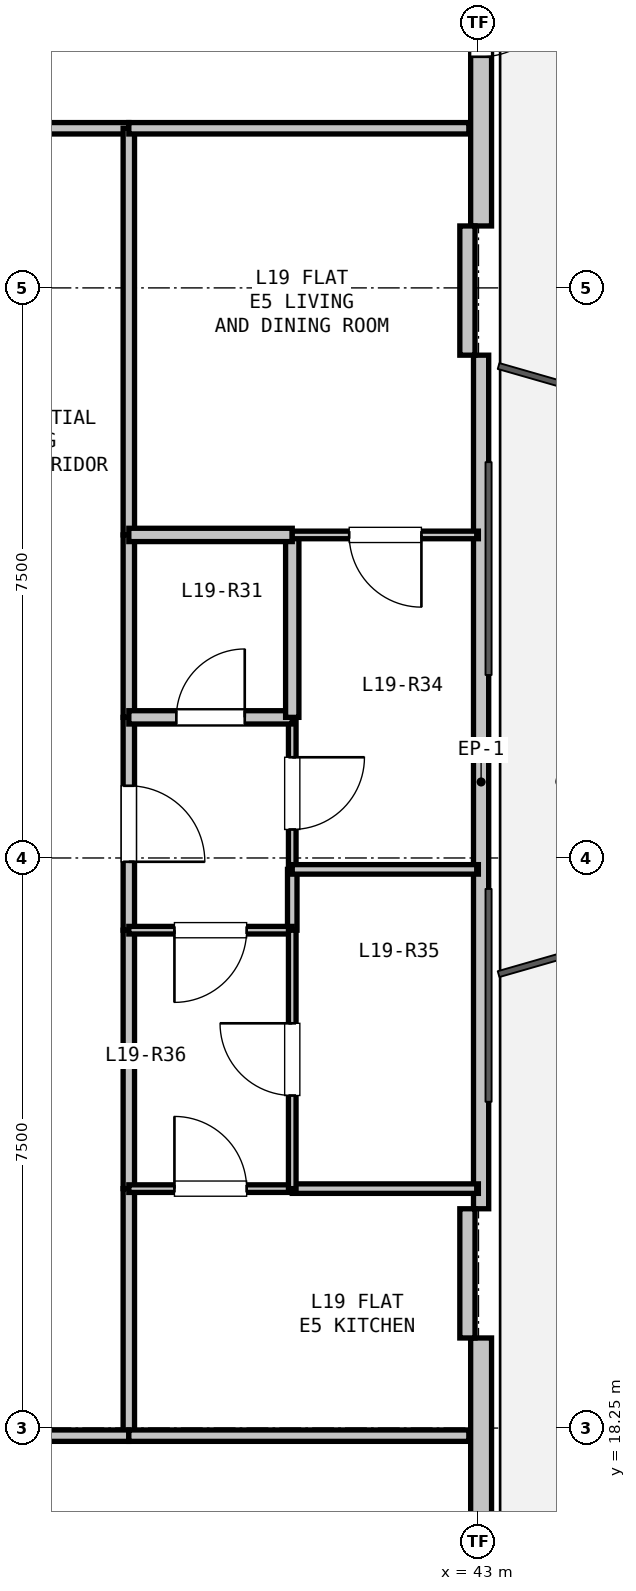
"""IFC4 building model, lengths in metres.
Left out: names, types, materials, properties, quantities, classifications, styles, units other than length and angle.
Written with IfcOpenShell. Run it as: python <this file> out.ifc"""

import sys

from ifc_helpers import new_model, si_unit, direction, frame, frame_2d, origin, place, context, subcontext, project, spatial, rectangle, extrude, element, fill, save


model = new_model("IFC4")
c1 = context("Model", 3, precision=1e-05, world=origin(), true_north=direction((0.0, 1.0)))
c2 = subcontext(c1, "Body", "Model", "MODEL_VIEW")
j1 = project(units=[si_unit("LENGTHUNIT", "METRE"), si_unit("PLANEANGLEUNIT", "RADIAN")], contexts=[c1])
p1 = place(None, origin())
s1 = spatial("IfcSite", under=j1, at=p1, CompositionType="ELEMENT")
p2 = place(p1, origin())
s2 = spatial("IfcBuilding", under=s1, at=p2, CompositionType="ELEMENT")
p3 = place(p2, frame((0.0, 0.0, 73.5)))
s3 = spatial("IfcBuildingStorey", under=s2, at=p3, CompositionType="ELEMENT", Elevation=73.5)
p4 = place(p3, frame((43.035, 45.994, 0.0), z_axis=(0.0, 0.0, 1.0), x_axis=(0.0, -1.0, 0.0)))
e1 = element("IfcWall", 1, at=p4, inside=s3, PredefinedType="SOLIDWALL", context=c2, shape_type="SweptSolid", body=[
    extrude(rectangle(XDim=11.93, YDim=0.275, at=frame_2d((5.965, 0.0))), origin(), (0.0, 0.0, 1.0), 2.67),
])
p5 = place(p4, frame((8.704, 0.0, 0.0)))
e2 = element("IfcOpeningElement", 2, at=p5, cuts=e1, PredefinedType="OPENING", context=c2, shape_type="SweptSolid", body=[
    extrude(rectangle(XDim=1.0, YDim=2.1, at=frame_2d((0.5, 1.05))), frame((0.0, 0.147, 0.0), z_axis=(0.0, -1.0, 0.0), x_axis=(1.0, 0.0, 0.0)), (0.0, 0.0, 1.0), 0.295),
])
p6 = place(p4, frame((4.214, 0.0, 0.9)))
e3 = element("IfcOpeningElement", 3, at=p6, cuts=e1, PredefinedType="OPENING", context=c2, shape_type="SweptSolid", body=[
    extrude(rectangle(XDim=0.9, YDim=1.4, at=frame_2d((0.45, 0.7))), frame((0.0, 0.147, 0.0), z_axis=(0.0, -1.0, 0.0), x_axis=(1.0, 0.0, 0.0)), (0.0, 0.0, 1.0), 0.295),
])
p7 = place(p3, frame((43.035, 32.365, 0.0), z_axis=(0.0, 0.0, 1.0), x_axis=(0.0, -1.0, 0.0)))
e4 = element("IfcWall", 4, at=p7, inside=s3, PredefinedType="PARAPET", context=c2, shape_type="SweptSolid", body=[
    extrude(rectangle(XDim=11.229, YDim=0.2, at=frame_2d((5.615, 0.0))), origin(), (0.0, 0.0, 1.0), 0.2),
])
p8 = place(p3, frame((43.035, 19.435, 0.0), z_axis=(0.0, 0.0, 1.0), x_axis=(0.0, -1.0, 0.0)))
e5 = element("IfcWall", 5, at=p8, inside=s3, PredefinedType="SOLIDWALL", context=c2, shape_type="SweptSolid", body=[
    extrude(rectangle(XDim=11.93, YDim=0.275, at=frame_2d((5.965, 0.0))), origin(), (0.0, 0.0, 1.0), 2.67),
])
p9 = place(p8, frame((9.826, 0.0, 0.9)))
e6 = element("IfcOpeningElement", 6, at=p9, cuts=e5, PredefinedType="OPENING", context=c2, shape_type="SweptSolid", body=[
    extrude(rectangle(XDim=1.2, YDim=1.4, at=frame_2d((0.6, 0.7))), frame((0.0, 0.147, 0.0), z_axis=(0.0, -1.0, 0.0), x_axis=(1.0, 0.0, 0.0)), (0.0, 0.0, 1.0), 0.295),
])
for number, where, z_axis, x_axis in (
    (7, (42.854, 34.065, 0.0), (0.0, 0.0, 1.0), (0.0, -1.0, 0.0)),
    (8, (42.854, 21.135, 0.0), (0.0, 0.0, 1.0), (0.0, -1.0, 0.0)),
):
    element("IfcWall", number, at=place(p3, frame(where, z_axis=z_axis, x_axis=x_axis)), inside=s3, PredefinedType="PARAPET", context=c2, shape_type="SweptSolid", body=[
        extrude(rectangle(XDim=1.7, YDim=0.2, at=frame_2d((0.85, 0.0))), origin(), (0.0, 0.0, 1.0), 2.67),
    ])
p10 = place(p3, frame((35.8, 35.35, 0.0), z_axis=(0.0, 0.0, 1.0), x_axis=(1.0, 0.0, 0.0)))
e9 = element("IfcWall", 9, at=p10, inside=s3, PredefinedType="PARTITIONING", context=c2, shape_type="SweptSolid", body=[
    extrude(rectangle(XDim=2.6, YDim=0.15, at=frame_2d((1.3, 0.0))), origin(), (0.0, 0.0, 1.0), 2.423),
])
p11 = place(p3, frame((38.4, 35.35, 0.0), z_axis=(0.0, 0.0, 1.0), x_axis=(0.0, -1.0, 0.0)))
e10 = element("IfcWall", 10, at=p11, inside=s3, PredefinedType="PARTITIONING", context=c2, shape_type="SweptSolid", body=[
    extrude(rectangle(XDim=5.35, YDim=0.15, at=frame_2d((2.675, 0.0))), origin(), (0.0, 0.0, 1.0), 3.05),
])
p12 = place(p3, frame((38.4, 30.0, 0.0), z_axis=(0.0, 0.0, 1.0), x_axis=(0.0, -1.0, 0.0)))
e11 = element("IfcWall", 11, at=p12, inside=s3, PredefinedType="PARTITIONING", context=c2, shape_type="SweptSolid", body=[
    extrude(rectangle(XDim=2.4, YDim=0.15, at=frame_2d((1.2, 0.0))), origin(), (0.0, 0.0, 1.0), 3.05),
])
p13 = place(p3, frame((38.4, 27.6, 0.0), z_axis=(0.0, 0.0, 1.0), x_axis=(0.0, -1.0, 0.0)))
e12 = element("IfcWall", 12, at=p13, inside=s3, PredefinedType="PARTITIONING", context=c2, shape_type="SweptSolid", body=[
    extrude(rectangle(XDim=2.8, YDim=0.15, at=frame_2d((1.4, 0.0))), origin(), (0.0, 0.0, 1.0), 3.05),
])
p14 = place(p13, frame((0.9, 0.0, 0.0)))
e13 = element("IfcOpeningElement", 13, at=p14, cuts=e12, PredefinedType="OPENING", context=c2, shape_type="SweptSolid", body=[
    extrude(rectangle(XDim=1.0, YDim=2.15, at=frame_2d((0.5, 1.075))), frame((0.0, 0.085, 0.0), z_axis=(0.0, -1.0, 0.0), x_axis=(1.0, 0.0, 0.0)), (0.0, 0.0, 1.0), 0.17),
])
p15 = place(p3, frame((38.4, 24.8, 0.0), z_axis=(0.0, 0.0, 1.0), x_axis=(0.0, -1.0, 0.0)))
e14 = element("IfcWall", 14, at=p15, inside=s3, PredefinedType="PARTITIONING", context=c2, shape_type="SweptSolid", body=[
    extrude(rectangle(XDim=3.4, YDim=0.15, at=frame_2d((1.7, 0.0))), origin(), (0.0, 0.0, 1.0), 3.05),
])
p16 = place(p3, frame((38.4, 21.4, 0.0), z_axis=(0.0, 0.0, 1.0), x_axis=(0.0, -1.0, 0.0)))
e15 = element("IfcWall", 15, at=p16, inside=s3, PredefinedType="PARTITIONING", context=c2, shape_type="SweptSolid", body=[
    extrude(rectangle(XDim=3.25, YDim=0.15, at=frame_2d((1.625, 0.0))), origin(), (0.0, 0.0, 1.0), 3.05),
])
p17 = place(p3, frame((38.4, 18.15, 0.0), z_axis=(0.0, 0.0, 1.0), x_axis=(-1.0, 0.0, 0.0)))
e16 = element("IfcWall", 16, at=p17, inside=s3, PredefinedType="PARTITIONING", context=c2, shape_type="SweptSolid", body=[
    extrude(rectangle(XDim=2.6, YDim=0.15, at=frame_2d((1.3, 0.0))), origin(), (0.0, 0.0, 1.0), 2.423),
])
p18 = place(p3, frame((40.55, 27.6, 0.0), z_axis=(0.0, 0.0, 1.0), x_axis=(0.0, -1.0, 0.0)))
e17 = element("IfcWall", 17, at=p18, inside=s3, PredefinedType="PARTITIONING", context=c2, shape_type="SweptSolid", body=[
    extrude(rectangle(XDim=2.0, YDim=0.1, at=frame_2d((1.0, 0.0))), origin(), (0.0, 0.0, 1.0), 3.05),
])
p19 = place(p18, frame((0.525, 0.0, 0.0)))
e18 = element("IfcOpeningElement", 18, at=p19, cuts=e17, PredefinedType="OPENING", context=c2, shape_type="SweptSolid", body=[
    extrude(rectangle(XDim=0.95, YDim=2.1, at=frame_2d((0.475, 1.05))), frame((0.0, 0.06, 0.0), z_axis=(0.0, -1.0, 0.0), x_axis=(1.0, 0.0, 0.0)), (0.0, 0.0, 1.0), 0.12),
])
p20 = place(p3, frame((40.55, 25.6, 0.0), z_axis=(0.0, 0.0, 1.0), x_axis=(0.0, -1.0, 0.0)))
e19 = element("IfcWall", 19, at=p20, inside=s3, PredefinedType="PARTITIONING", context=c2, shape_type="SweptSolid", body=[
    extrude(rectangle(XDim=0.8, YDim=0.125, at=frame_2d((0.4, 0.0))), origin(), (0.0, 0.0, 1.0), 3.05),
])
p21 = place(p3, frame((40.55, 24.8, 0.0), z_axis=(0.0, 0.0, 1.0), x_axis=(-1.0, 0.0, 0.0)))
e20 = element("IfcWall", 20, at=p21, inside=s3, PredefinedType="PARTITIONING", context=c2, shape_type="SweptSolid", body=[
    extrude(rectangle(XDim=2.15, YDim=0.1, at=frame_2d((1.075, 0.0))), origin(), (0.0, 0.0, 1.0), 3.05),
])
p22 = place(p21, frame((0.6, 0.0, 0.0)))
e21 = element("IfcOpeningElement", 21, at=p22, cuts=e20, PredefinedType="OPENING", context=c2, shape_type="SweptSolid", body=[
    extrude(rectangle(XDim=0.95, YDim=2.1, at=frame_2d((0.475, 1.05))), frame((0.0, 0.06, 0.0), z_axis=(0.0, -1.0, 0.0), x_axis=(1.0, 0.0, 0.0)), (0.0, 0.0, 1.0), 0.12),
])
p23 = place(p3, frame((38.4, 27.6, 0.0), z_axis=(0.0, 0.0, 1.0), x_axis=(1.0, 0.0, 0.0)))
e22 = element("IfcWall", 22, at=p23, inside=s3, PredefinedType="PLUMBINGWALL", context=c2, shape_type="SweptSolid", body=[
    extrude(rectangle(XDim=2.15, YDim=0.175, at=frame_2d((1.075, 0.0))), origin(), (0.0, 0.0, 1.0), 3.05),
])
p24 = place(p23, frame((0.625, 0.0, 0.0)))
e23 = element("IfcOpeningElement", 23, at=p24, cuts=e22, PredefinedType="OPENING", context=c2, shape_type="SweptSolid", body=[
    extrude(rectangle(XDim=0.9, YDim=2.1, at=frame_2d((0.45, 1.05))), frame((0.0, 0.097, 0.0), z_axis=(0.0, -1.0, 0.0), x_axis=(1.0, 0.0, 0.0)), (0.0, 0.0, 1.0), 0.195),
])
p25 = place(p3, frame((38.4, 18.15, 0.0), z_axis=(0.0, 0.0, 1.0), x_axis=(1.0, 0.0, 0.0)))
e24 = element("IfcWall", 24, at=p25, inside=s3, PredefinedType="PARTITIONING", context=c2, shape_type="SweptSolid", body=[
    extrude(rectangle(XDim=4.473, YDim=0.15, at=frame_2d((2.237, 0.0))), origin(), (0.0, 0.0, 1.0), 2.365),
])
p26 = place(p3, frame((40.55, 30.0, 0.0), z_axis=(0.0, 0.0, 1.0), x_axis=(0.0, -1.0, 0.0)))
e25 = element("IfcWall", 25, at=p26, inside=s3, PredefinedType="PLUMBINGWALL", context=c2, shape_type="SweptSolid", body=[
    extrude(rectangle(XDim=2.4, YDim=0.175, at=frame_2d((1.2, 0.0))), origin(), (0.0, 0.0, 1.0), 3.05),
])
p27 = place(p3, frame((38.4, 30.0, 0.0), z_axis=(0.0, 0.0, 1.0), x_axis=(1.0, 0.0, 0.0)))
e26 = element("IfcWall", 26, at=p27, inside=s3, PredefinedType="PLUMBINGWALL", context=c2, shape_type="SweptSolid", body=[
    extrude(rectangle(XDim=2.15, YDim=0.175, at=frame_2d((1.075, 0.0))), origin(), (0.0, 0.0, 1.0), 3.05),
])
p28 = place(p3, frame((38.4, 21.4, 0.0), z_axis=(0.0, 0.0, 1.0), x_axis=(1.0, 0.0, 0.0)))
e27 = element("IfcWall", 27, at=p28, inside=s3, PredefinedType="PARTITIONING", context=c2, shape_type="SweptSolid", body=[
    extrude(rectangle(XDim=2.15, YDim=0.1, at=frame_2d((1.075, 0.0))), origin(), (0.0, 0.0, 1.0), 3.05),
])
p29 = place(p28, frame((0.6, 0.0, 0.0)))
e28 = element("IfcOpeningElement", 28, at=p29, cuts=e27, PredefinedType="OPENING", context=c2, shape_type="SweptSolid", body=[
    extrude(rectangle(XDim=0.95, YDim=2.1, at=frame_2d((0.475, 1.05))), frame((0.0, 0.06, 0.0), z_axis=(0.0, -1.0, 0.0), x_axis=(1.0, 0.0, 0.0)), (0.0, 0.0, 1.0), 0.12),
])
p30 = place(p3, frame((40.55, 21.4, 0.0), z_axis=(0.0, 0.0, 1.0), x_axis=(1.0, 0.0, 0.0)))
e29 = element("IfcWall", 29, at=p30, inside=s3, PredefinedType="PARTITIONING", context=c2, shape_type="SweptSolid", body=[
    extrude(rectangle(XDim=2.448, YDim=0.125, at=frame_2d((1.224, 0.0))), origin(), (0.0, 0.0, 1.0), 2.365),
])
p31 = place(p3, frame((42.873, 35.35, 0.0), z_axis=(0.0, 0.0, 1.0), x_axis=(-1.0, 0.0, 0.0)))
e30 = element("IfcWall", 30, at=p31, inside=s3, PredefinedType="PARTITIONING", context=c2, shape_type="SweptSolid", body=[
    extrude(rectangle(XDim=4.473, YDim=0.15, at=frame_2d((2.237, 0.0))), origin(), (0.0, 0.0, 1.0), 2.365),
])
p32 = place(p3, frame((42.999, 30.0, 0.0), z_axis=(0.0, 0.0, 1.0), x_axis=(-1.0, 0.0, 0.0)))
e31 = element("IfcWall", 31, at=p32, inside=s3, PredefinedType="PARTITIONING", context=c2, shape_type="SweptSolid", body=[
    extrude(rectangle(XDim=2.448, YDim=0.1, at=frame_2d((1.224, 0.0))), origin(), (0.0, 0.0, 1.0), 2.365),
])
p33 = place(p32, frame((0.749, 0.0, 0.0)))
e32 = element("IfcOpeningElement", 32, at=p33, cuts=e31, PredefinedType="OPENING", context=c2, shape_type="SweptSolid", body=[
    extrude(rectangle(XDim=0.95, YDim=2.1, at=frame_2d((0.475, 1.05))), frame((0.0, 0.06, 0.0), z_axis=(0.0, -1.0, 0.0), x_axis=(1.0, 0.0, 0.0)), (0.0, 0.0, 1.0), 0.12),
])
p34 = place(p3, frame((42.999, 25.6, 0.0), z_axis=(0.0, 0.0, 1.0), x_axis=(-1.0, 0.0, 0.0)))
e33 = element("IfcWall", 33, at=p34, inside=s3, PredefinedType="PARTITIONING", context=c2, shape_type="SweptSolid", body=[
    extrude(rectangle(XDim=2.448, YDim=0.125, at=frame_2d((1.224, 0.0))), origin(), (0.0, 0.0, 1.0), 2.365),
])
p35 = place(p3, frame((40.55, 21.4, 0.0), z_axis=(0.0, 0.0, 1.0), x_axis=(0.0, 1.0, 0.0)))
e34 = element("IfcWall", 34, at=p35, inside=s3, PredefinedType="PARTITIONING", context=c2, shape_type="SweptSolid", body=[
    extrude(rectangle(XDim=3.4, YDim=0.1, at=frame_2d((1.7, 0.0))), origin(), (0.0, 0.0, 1.0), 3.05),
])
p36 = place(p35, frame((1.225, 0.0, 0.0)))
e35 = element("IfcOpeningElement", 35, at=p36, cuts=e34, PredefinedType="OPENING", context=c2, shape_type="SweptSolid", body=[
    extrude(rectangle(XDim=0.95, YDim=2.1, at=frame_2d((0.475, 1.05))), frame((0.0, 0.06, 0.0), z_axis=(0.0, -1.0, 0.0), x_axis=(1.0, 0.0, 0.0)), (0.0, 0.0, 1.0), 0.12),
])
p37 = place(p5, origin())
e36 = element("IfcDoor", 36, at=p37, inside=s3, OperationType="SINGLE_SWING_LEFT", PredefinedType="DOOR", context=c2, shape_type="SweptSolid", body=[
    extrude(rectangle(XDim=1.0, YDim=2.1, at=frame_2d((0.5, 1.05))), frame((0.0, 0.025, 0.0), z_axis=(0.0, -1.0, 0.0), x_axis=(1.0, 0.0, 0.0)), (0.0, 0.0, 1.0), 0.05),
])
fill(e2, e36)
p38 = place(p14, origin())
e37 = element("IfcDoor", 37, at=p38, inside=s3, OperationType="SINGLE_SWING_RIGHT", PredefinedType="DOOR", context=c2, shape_type="SweptSolid", body=[
    extrude(rectangle(XDim=1.0, YDim=2.15, at=frame_2d((0.5, 1.075))), frame((0.0, 0.025, 0.0), z_axis=(0.0, -1.0, 0.0), x_axis=(1.0, 0.0, 0.0)), (0.0, 0.0, 1.0), 0.05),
])
fill(e13, e37)
p39 = place(p24, origin())
e38 = element("IfcDoor", 38, at=p39, inside=s3, OperationType="SINGLE_SWING_RIGHT", PredefinedType="DOOR", context=c2, shape_type="SweptSolid", body=[
    extrude(rectangle(XDim=0.9, YDim=2.1, at=frame_2d((0.45, 1.05))), frame((0.0, 0.025, 0.0), z_axis=(0.0, -1.0, 0.0), x_axis=(1.0, 0.0, 0.0)), (0.0, 0.0, 1.0), 0.05),
])
fill(e23, e38)
p40 = place(p19, origin())
e39 = element("IfcDoor", 39, at=p40, inside=s3, OperationType="SINGLE_SWING_LEFT", PredefinedType="DOOR", context=c2, shape_type="SweptSolid", body=[
    extrude(rectangle(XDim=0.95, YDim=2.1, at=frame_2d((0.475, 1.05))), frame((0.0, 0.025, 0.0), z_axis=(0.0, -1.0, 0.0), x_axis=(1.0, 0.0, 0.0)), (0.0, 0.0, 1.0), 0.05),
])
fill(e18, e39)
p41 = place(p22, origin())
e40 = element("IfcDoor", 40, at=p41, inside=s3, OperationType="SINGLE_SWING_RIGHT", PredefinedType="DOOR", context=c2, shape_type="SweptSolid", body=[
    extrude(rectangle(XDim=0.95, YDim=2.1, at=frame_2d((0.475, 1.05))), frame((0.0, 0.025, 0.0), z_axis=(0.0, -1.0, 0.0), x_axis=(1.0, 0.0, 0.0)), (0.0, 0.0, 1.0), 0.05),
])
fill(e21, e40)
p42 = place(p29, origin())
e41 = element("IfcDoor", 41, at=p42, inside=s3, OperationType="SINGLE_SWING_LEFT", PredefinedType="DOOR", context=c2, shape_type="SweptSolid", body=[
    extrude(rectangle(XDim=0.95, YDim=2.1, at=frame_2d((0.475, 1.05))), frame((0.0, 0.025, 0.0), z_axis=(0.0, -1.0, 0.0), x_axis=(1.0, 0.0, 0.0)), (0.0, 0.0, 1.0), 0.05),
])
fill(e28, e41)
p43 = place(p33, origin())
e42 = element("IfcDoor", 42, at=p43, inside=s3, OperationType="SINGLE_SWING_LEFT", PredefinedType="DOOR", context=c2, shape_type="SweptSolid", body=[
    extrude(rectangle(XDim=0.95, YDim=2.1, at=frame_2d((0.475, 1.05))), frame((0.0, 0.025, 0.0), z_axis=(0.0, -1.0, 0.0), x_axis=(1.0, 0.0, 0.0)), (0.0, 0.0, 1.0), 0.05),
])
fill(e32, e42)
p44 = place(p36, origin())
e43 = element("IfcDoor", 43, at=p44, inside=s3, OperationType="SINGLE_SWING_RIGHT", PredefinedType="DOOR", context=c2, shape_type="SweptSolid", body=[
    extrude(rectangle(XDim=0.95, YDim=2.1, at=frame_2d((0.475, 1.05))), frame((0.0, 0.025, 0.0), z_axis=(0.0, -1.0, 0.0), x_axis=(1.0, 0.0, 0.0)), (0.0, 0.0, 1.0), 0.05),
])
fill(e35, e43)
save(model, sys.argv[1])
